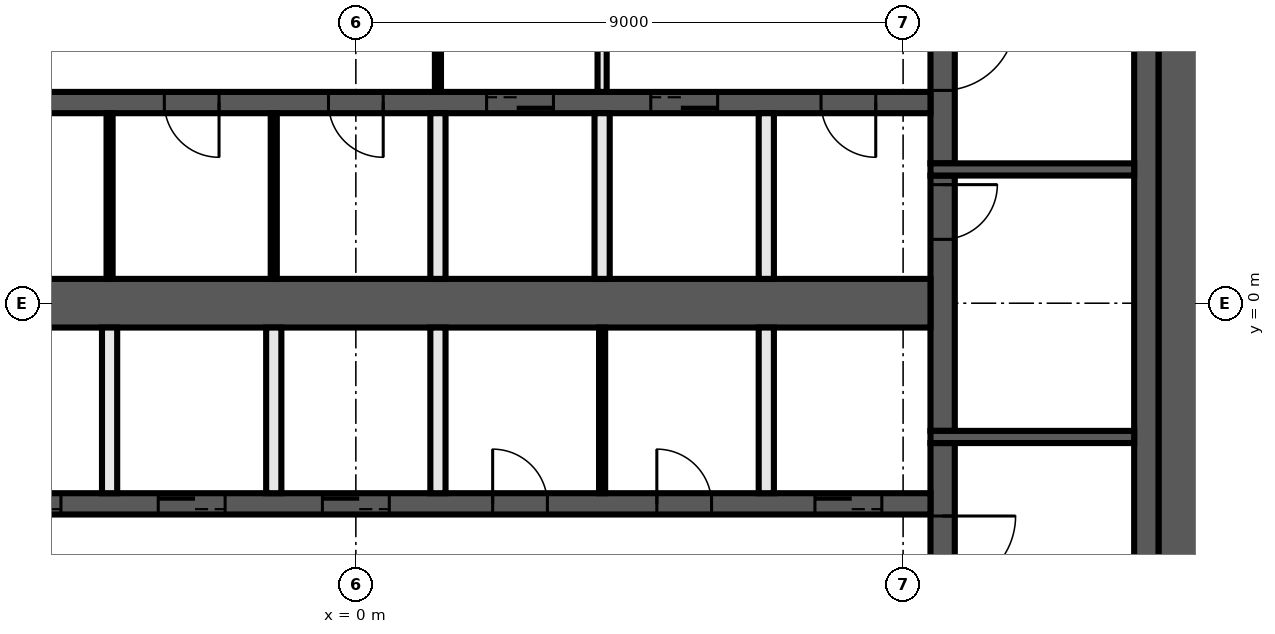
"""IFC4 building model, lengths in metres.
Left out: names, types, materials, properties, quantities, classifications, styles, units other than length and angle.
Written with IfcOpenShell. Run it as: python <this file> out.ifc"""

import sys

from ifc_helpers import new_model, si_unit, direction, frame, frame_2d, origin, place, context, subcontext, project, spatial, rectangle, extrude, element, fill, save


model = new_model("IFC4")
c1 = context("Model", 3, precision=1e-05, world=origin(), true_north=direction((0.0, 1.0)))
c2 = subcontext(c1, "Body", "Model", "MODEL_VIEW")
j1 = project(units=[si_unit("LENGTHUNIT", "METRE"), si_unit("PLANEANGLEUNIT", "RADIAN")], contexts=[c1])
p1 = place(None, origin())
s1 = spatial("IfcSite", under=j1, at=p1, CompositionType="ELEMENT")
p2 = place(p1, origin())
s2 = spatial("IfcBuilding", under=s1, at=p2, CompositionType="ELEMENT")
p3 = place(p2, frame((0.0, 0.0, 162.8)))
s3 = spatial("IfcBuildingStorey", under=s2, at=p3, CompositionType="ELEMENT", Elevation=162.8)
p4 = place(p3, frame((13.6, 10.2, 0.0), z_axis=(0.0, 0.0, 1.0), x_axis=(0.0, -1.0, 0.0)))
e1 = element("IfcWall", 1, at=p4, inside=s3, PredefinedType="SHEAR", context=c2, shape_type="SweptSolid", body=[
    extrude(rectangle(XDim=20.4, YDim=0.8, at=frame_2d((10.2, 0.0))), origin(), (0.0, 0.0, 1.0), 3.82),
])
p5 = place(p3, frame((13.0, 9.8, 0.0), z_axis=(0.0, 0.0, 1.0), x_axis=(0.0, -1.0, 0.0)))
e2 = element("IfcWall", 2, at=p5, inside=s3, PredefinedType="SHEAR", context=c2, shape_type="SweptSolid", body=[
    extrude(rectangle(XDim=19.6, YDim=0.4, at=frame_2d((9.8, 0.0))), origin(), (0.0, 0.0, 1.0), 3.82),
])
p6 = place(p3, frame((9.65, -2.3, 0.0), z_axis=(0.0, 0.0, 1.0), x_axis=(0.0, -1.0, 0.0)))
e3 = element("IfcWall", 3, at=p6, inside=s3, PredefinedType="SHEAR", context=c2, shape_type="SweptSolid", body=[
    extrude(rectangle(XDim=7.5, YDim=0.4, at=frame_2d((3.75, 0.0))), origin(), (0.0, 0.0, 1.0), 3.82),
])
p7 = place(p6, frame((1.2, 0.0, 0.0)))
e4 = element("IfcOpeningElement", 4, at=p7, cuts=e3, PredefinedType="OPENING", context=c2, shape_type="SweptSolid", body=[
    extrude(rectangle(XDim=1.2, YDim=2.1, at=frame_2d((0.6, 1.05))), frame((0.0, 0.21, 0.0), z_axis=(0.0, -1.0, 0.0), x_axis=(1.0, 0.0, 0.0)), (0.0, 0.0, 1.0), 0.42),
])
p8 = place(p3, frame((9.65, 2.1, 0.0), z_axis=(0.0, 0.0, 1.0), x_axis=(0.0, -1.0, 0.0)))
e5 = element("IfcWall", 5, at=p8, inside=s3, PredefinedType="SHEAR", context=c2, shape_type="SweptSolid", body=[
    extrude(rectangle(XDim=4.2, YDim=0.4, at=frame_2d((2.1, 0.0))), origin(), (0.0, 0.0, 1.0), 3.82),
])
p9 = place(p8, frame((0.15, 0.0, 0.0)))
e6 = element("IfcOpeningElement", 6, at=p9, cuts=e5, PredefinedType="OPENING", context=c2, shape_type="SweptSolid", body=[
    extrude(rectangle(XDim=0.9, YDim=2.1, at=frame_2d((0.45, 1.05))), frame((0.0, 0.21, 0.0), z_axis=(0.0, -1.0, 0.0), x_axis=(1.0, 0.0, 0.0)), (0.0, 0.0, 1.0), 0.42),
])
p10 = place(p3, frame((9.65, 9.8, 0.0), z_axis=(0.0, 0.0, 1.0), x_axis=(0.0, -1.0, 0.0)))
e7 = element("IfcWall", 7, at=p10, inside=s3, PredefinedType="SHEAR", context=c2, shape_type="SweptSolid", body=[
    extrude(rectangle(XDim=7.5, YDim=0.4, at=frame_2d((3.75, 0.0))), origin(), (0.0, 0.0, 1.0), 3.82),
])
p11 = place(p10, frame((5.1, 0.0, 0.0)))
e8 = element("IfcOpeningElement", 8, at=p11, cuts=e7, PredefinedType="OPENING", context=c2, shape_type="SweptSolid", body=[
    extrude(rectangle(XDim=1.2, YDim=2.1, at=frame_2d((0.6, 1.05))), frame((0.0, 0.21, 0.0), z_axis=(0.0, -1.0, 0.0), x_axis=(1.0, 0.0, 0.0)), (0.0, 0.0, 1.0), 0.42),
])
for number, where, z_axis, x_axis in (
    (9, (9.45, 2.2, 0.0), (0.0, 0.0, 1.0), (1.0, 0.0, 0.0)),
    (10, (9.45, -2.2, 0.0), (0.0, 0.0, 1.0), (1.0, 0.0, 0.0)),
):
    element("IfcWall", number, at=place(p3, frame(where, z_axis=z_axis, x_axis=x_axis)), inside=s3, PredefinedType="SHEAR", context=c2, shape_type="SweptSolid", body=[
        extrude(rectangle(XDim=3.35, YDim=0.2, at=frame_2d((1.675, 0.0))), origin(), (0.0, 0.0, 1.0), 3.82),
    ])
p12 = place(p3, frame((9.45, 3.3, 0.0), z_axis=(0.0, 0.0, 1.0), x_axis=(-1.0, 0.0, 0.0)))
e11 = element("IfcWall", 11, at=p12, inside=s3, PredefinedType="SHEAR", context=c2, shape_type="SweptSolid", body=[
    extrude(rectangle(XDim=18.9, YDim=0.35, at=frame_2d((9.45, 0.0))), origin(), (0.0, 0.0, 1.0), 3.82),
])
p13 = place(p12, frame((6.2, 0.0, 0.0)))
e12 = element("IfcOpeningElement", 12, at=p13, cuts=e11, PredefinedType="OPENING", context=c2, shape_type="SweptSolid", body=[
    extrude(rectangle(XDim=1.1, YDim=2.1, at=frame_2d((0.55, 1.05))), frame((0.0, 0.185, 0.0), z_axis=(0.0, -1.0, 0.0), x_axis=(1.0, 0.0, 0.0)), (0.0, 0.0, 1.0), 0.37),
])
p14 = place(p12, frame((3.5, 0.0, 0.0)))
e13 = element("IfcOpeningElement", 13, at=p14, cuts=e11, PredefinedType="OPENING", context=c2, shape_type="SweptSolid", body=[
    extrude(rectangle(XDim=1.1, YDim=2.1, at=frame_2d((0.55, 1.05))), frame((0.0, 0.185, 0.0), z_axis=(0.0, -1.0, 0.0), x_axis=(1.0, 0.0, 0.0)), (0.0, 0.0, 1.0), 0.37),
])
p15 = place(p12, frame((0.9, 0.0, 0.0)))
e14 = element("IfcOpeningElement", 14, at=p15, cuts=e11, PredefinedType="OPENING", context=c2, shape_type="SweptSolid", body=[
    extrude(rectangle(XDim=0.9, YDim=2.1, at=frame_2d((0.45, 1.05))), frame((0.0, 0.185, 0.0), z_axis=(0.0, -1.0, 0.0), x_axis=(1.0, 0.0, 0.0)), (0.0, 0.0, 1.0), 0.37),
])
p16 = place(p12, frame((15.75, 0.0, 0.0)))
e15 = element("IfcOpeningElement", 15, at=p16, cuts=e11, PredefinedType="OPENING", context=c2, shape_type="SweptSolid", body=[
    extrude(rectangle(XDim=0.9, YDim=2.1, at=frame_2d((0.45, 1.05))), frame((0.0, 0.185, 0.0), z_axis=(0.0, -1.0, 0.0), x_axis=(1.0, 0.0, 0.0)), (0.0, 0.0, 1.0), 0.37),
])
p17 = place(p12, frame((11.7, 0.0, 0.0)))
e16 = element("IfcOpeningElement", 16, at=p17, cuts=e11, PredefinedType="OPENING", context=c2, shape_type="SweptSolid", body=[
    extrude(rectangle(XDim=0.9, YDim=2.1, at=frame_2d((0.45, 1.05))), frame((0.0, 0.185, 0.0), z_axis=(0.0, -1.0, 0.0), x_axis=(1.0, 0.0, 0.0)), (0.0, 0.0, 1.0), 0.37),
])
p18 = place(p12, frame((9.0, 0.0, 0.0)))
e17 = element("IfcOpeningElement", 17, at=p18, cuts=e11, PredefinedType="OPENING", context=c2, shape_type="SweptSolid", body=[
    extrude(rectangle(XDim=0.9, YDim=2.1, at=frame_2d((0.45, 1.05))), frame((0.0, 0.185, 0.0), z_axis=(0.0, -1.0, 0.0), x_axis=(1.0, 0.0, 0.0)), (0.0, 0.0, 1.0), 0.37),
])
p19 = place(p3, frame((-9.45, -3.3, 0.0), z_axis=(0.0, 0.0, 1.0), x_axis=(1.0, 0.0, 0.0)))
e18 = element("IfcWall", 18, at=p19, inside=s3, PredefinedType="SHEAR", context=c2, shape_type="SweptSolid", body=[
    extrude(rectangle(XDim=18.9, YDim=0.35, at=frame_2d((9.45, 0.0))), origin(), (0.0, 0.0, 1.0), 3.82),
])
p20 = place(p19, frame((0.8, 0.0, 0.0)))
e19 = element("IfcOpeningElement", 19, at=p20, cuts=e18, PredefinedType="OPENING", context=c2, shape_type="SweptSolid", body=[
    extrude(rectangle(XDim=1.1, YDim=2.1, at=frame_2d((0.55, 1.05))), frame((0.0, 0.185, 0.0), z_axis=(0.0, -1.0, 0.0), x_axis=(1.0, 0.0, 0.0)), (0.0, 0.0, 1.0), 0.37),
])
p21 = place(p19, frame((3.5, 0.0, 0.0)))
e20 = element("IfcOpeningElement", 20, at=p21, cuts=e18, PredefinedType="OPENING", context=c2, shape_type="SweptSolid", body=[
    extrude(rectangle(XDim=1.1, YDim=2.1, at=frame_2d((0.55, 1.05))), frame((0.0, 0.185, 0.0), z_axis=(0.0, -1.0, 0.0), x_axis=(1.0, 0.0, 0.0)), (0.0, 0.0, 1.0), 0.37),
])
p22 = place(p19, frame((6.2, 0.0, 0.0)))
e21 = element("IfcOpeningElement", 21, at=p22, cuts=e18, PredefinedType="OPENING", context=c2, shape_type="SweptSolid", body=[
    extrude(rectangle(XDim=1.1, YDim=2.1, at=frame_2d((0.55, 1.05))), frame((0.0, 0.185, 0.0), z_axis=(0.0, -1.0, 0.0), x_axis=(1.0, 0.0, 0.0)), (0.0, 0.0, 1.0), 0.37),
])
p23 = place(p19, frame((8.9, 0.0, 0.0)))
e22 = element("IfcOpeningElement", 22, at=p23, cuts=e18, PredefinedType="OPENING", context=c2, shape_type="SweptSolid", body=[
    extrude(rectangle(XDim=1.1, YDim=2.1, at=frame_2d((0.55, 1.05))), frame((0.0, 0.185, 0.0), z_axis=(0.0, -1.0, 0.0), x_axis=(1.0, 0.0, 0.0)), (0.0, 0.0, 1.0), 0.37),
])
p24 = place(p19, frame((17.0, 0.0, 0.0)))
e23 = element("IfcOpeningElement", 23, at=p24, cuts=e18, PredefinedType="OPENING", context=c2, shape_type="SweptSolid", body=[
    extrude(rectangle(XDim=1.1, YDim=2.1, at=frame_2d((0.55, 1.05))), frame((0.0, 0.185, 0.0), z_axis=(0.0, -1.0, 0.0), x_axis=(1.0, 0.0, 0.0)), (0.0, 0.0, 1.0), 0.37),
])
p25 = place(p19, frame((11.7, 0.0, 0.0)))
e24 = element("IfcOpeningElement", 24, at=p25, cuts=e18, PredefinedType="OPENING", context=c2, shape_type="SweptSolid", body=[
    extrude(rectangle(XDim=0.9, YDim=2.1, at=frame_2d((0.45, 1.05))), frame((0.0, 0.185, 0.0), z_axis=(0.0, -1.0, 0.0), x_axis=(1.0, 0.0, 0.0)), (0.0, 0.0, 1.0), 0.37),
])
p26 = place(p19, frame((14.4, 0.0, 0.0)))
e25 = element("IfcOpeningElement", 25, at=p26, cuts=e18, PredefinedType="OPENING", context=c2, shape_type="SweptSolid", body=[
    extrude(rectangle(XDim=0.9, YDim=2.1, at=frame_2d((0.45, 1.05))), frame((0.0, 0.185, 0.0), z_axis=(0.0, -1.0, 0.0), x_axis=(1.0, 0.0, 0.0)), (0.0, 0.0, 1.0), 0.37),
])
p27 = place(p3, frame((-9.45, 0.0, 0.0), z_axis=(0.0, 0.0, 1.0), x_axis=(1.0, 0.0, 0.0)))
e26 = element("IfcWall", 26, at=p27, inside=s3, PredefinedType="SHEAR", context=c2, shape_type="SweptSolid", body=[
    extrude(rectangle(XDim=18.9, YDim=0.8, at=frame_2d((9.45, 0.0))), origin(), (0.0, 0.0, 1.0), 3.82),
])
for number, where, z_axis, x_axis in (
    (27, (6.75, -3.125, 0.0), (0.0, 0.0, 1.0), (0.0, 1.0, 0.0)),
    (28, (6.75, 0.4, 0.0), (0.0, 0.0, 1.0), (0.0, 1.0, 0.0)),
):
    element("IfcWall", number, at=place(p3, frame(where, z_axis=z_axis, x_axis=x_axis)), inside=s3, PredefinedType="SOLIDWALL", context=c2, shape_type="SweptSolid", body=[
        extrude(rectangle(XDim=2.725, YDim=0.25, at=frame_2d((1.363, 0.0))), origin(), (0.0, 0.0, 1.0), 3.82),
    ])
p28 = place(p3, frame((4.05, 6.725, 0.0), z_axis=(0.0, 0.0, 1.0), x_axis=(0.0, -1.0, 0.0)))
e29 = element("IfcWall", 29, at=p28, inside=s3, PredefinedType="PARTITIONING", context=c2, shape_type="SweptSolid", body=[
    extrude(rectangle(XDim=3.25, YDim=0.15, at=frame_2d((1.625, 0.0))), origin(), (0.0, 0.0, 1.0), 3.82),
])
p29 = place(p28, frame((1.025, 0.0, 0.0)))
e30 = element("IfcOpeningElement", 30, at=p29, cuts=e29, PredefinedType="OPENING", context=c2, shape_type="SweptSolid", body=[
    extrude(rectangle(XDim=1.2, YDim=2.1, at=frame_2d((0.6, 1.05))), frame((0.0, 0.085, 0.0), z_axis=(0.0, -1.0, 0.0), x_axis=(1.0, 0.0, 0.0)), (0.0, 0.0, 1.0), 0.17),
])
p30 = place(p3, frame((4.05, -3.125, 0.0), z_axis=(0.0, 0.0, 1.0), x_axis=(0.0, 1.0, 0.0)))
e31 = element("IfcWall", 31, at=p30, inside=s3, PredefinedType="PARTITIONING", context=c2, shape_type="SweptSolid", body=[
    extrude(rectangle(XDim=2.725, YDim=0.1, at=frame_2d((1.363, 0.0))), origin(), (0.0, 0.0, 1.0), 3.82),
])
p31 = place(p3, frame((4.05, 0.4, 0.0), z_axis=(0.0, 0.0, 1.0), x_axis=(0.0, 1.0, 0.0)))
e32 = element("IfcWall", 32, at=p31, inside=s3, PredefinedType="SOLIDWALL", context=c2, shape_type="SweptSolid", body=[
    extrude(rectangle(XDim=2.725, YDim=0.25, at=frame_2d((1.363, 0.0))), origin(), (0.0, 0.0, 1.0), 3.82),
])
p32 = place(p3, frame((1.35, 6.725, 0.0), z_axis=(0.0, 0.0, 1.0), x_axis=(0.0, -1.0, 0.0)))
e33 = element("IfcWall", 33, at=p32, inside=s3, PredefinedType="PARTITIONING", context=c2, shape_type="SweptSolid", body=[
    extrude(rectangle(XDim=3.25, YDim=0.1, at=frame_2d((1.625, 0.0))), origin(), (0.0, 0.0, 1.0), 3.82),
])
p33 = place(p32, frame((1.025, 0.0, 0.0)))
e34 = element("IfcOpeningElement", 34, at=p33, cuts=e33, PredefinedType="OPENING", context=c2, shape_type="SweptSolid", body=[
    extrude(rectangle(XDim=1.2, YDim=2.1, at=frame_2d((0.6, 1.05))), frame((0.0, 0.06, 0.0), z_axis=(0.0, -1.0, 0.0), x_axis=(1.0, 0.0, 0.0)), (0.0, 0.0, 1.0), 0.12),
])
for number, where, z_axis, x_axis in (
    (35, (1.35, -3.125, 0.0), (0.0, 0.0, 1.0), (0.0, 1.0, 0.0)),
    (36, (1.35, 0.4, 0.0), (0.0, 0.0, 1.0), (0.0, 1.0, 0.0)),
):
    element("IfcWall", number, at=place(p3, frame(where, z_axis=z_axis, x_axis=x_axis)), inside=s3, PredefinedType="SOLIDWALL", context=c2, shape_type="SweptSolid", body=[
        extrude(rectangle(XDim=2.725, YDim=0.25, at=frame_2d((1.363, 0.0))), origin(), (0.0, 0.0, 1.0), 3.82),
    ])
p34 = place(p3, frame((-1.35, 0.4, 0.0), z_axis=(0.0, 0.0, 1.0), x_axis=(0.0, 1.0, 0.0)))
e37 = element("IfcWall", 37, at=p34, inside=s3, PredefinedType="PARTITIONING", context=c2, shape_type="SweptSolid", body=[
    extrude(rectangle(XDim=2.725, YDim=0.1, at=frame_2d((1.363, 0.0))), origin(), (0.0, 0.0, 1.0), 3.82),
])
p35 = place(p3, frame((-1.35, -3.125, 0.0), z_axis=(0.0, 0.0, 1.0), x_axis=(0.0, 1.0, 0.0)))
e38 = element("IfcWall", 38, at=p35, inside=s3, PredefinedType="SOLIDWALL", context=c2, shape_type="SweptSolid", body=[
    extrude(rectangle(XDim=2.725, YDim=0.25, at=frame_2d((1.363, 0.0))), origin(), (0.0, 0.0, 1.0), 3.82),
])
p36 = place(p3, frame((-4.05, 0.4, 0.0), z_axis=(0.0, 0.0, 1.0), x_axis=(0.0, 1.0, 0.0)))
e39 = element("IfcWall", 39, at=p36, inside=s3, PredefinedType="PARTITIONING", context=c2, shape_type="SweptSolid", body=[
    extrude(rectangle(XDim=2.725, YDim=0.1, at=frame_2d((1.363, 0.0))), origin(), (0.0, 0.0, 1.0), 3.82),
])
p37 = place(p3, frame((-4.05, -3.125, 0.0), z_axis=(0.0, 0.0, 1.0), x_axis=(0.0, 1.0, 0.0)))
e40 = element("IfcWall", 40, at=p37, inside=s3, PredefinedType="SOLIDWALL", context=c2, shape_type="SweptSolid", body=[
    extrude(rectangle(XDim=2.725, YDim=0.25, at=frame_2d((1.363, 0.0))), origin(), (0.0, 0.0, 1.0), 3.82),
])
p38 = place(p9, origin())
e41 = element("IfcDoor", 41, at=p38, inside=s3, OperationType="SINGLE_SWING_RIGHT", PredefinedType="DOOR", context=c2, shape_type="SweptSolid", body=[
    extrude(rectangle(XDim=0.9, YDim=2.1, at=frame_2d((0.45, 1.05))), frame((0.0, 0.025, 0.0), z_axis=(0.0, -1.0, 0.0), x_axis=(1.0, 0.0, 0.0)), (0.0, 0.0, 1.0), 0.05),
])
fill(e6, e41)
p39 = place(p13, origin())
e42 = element("IfcDoor", 42, at=p39, inside=s3, OperationType="DOUBLE_DOOR_SLIDING", PredefinedType="DOOR", context=c2, shape_type="SweptSolid", body=[
    extrude(rectangle(XDim=1.1, YDim=2.1, at=frame_2d((0.55, 1.05))), frame((0.0, 0.025, 0.0), z_axis=(0.0, -1.0, 0.0), x_axis=(1.0, 0.0, 0.0)), (0.0, 0.0, 1.0), 0.05),
])
fill(e12, e42)
p40 = place(p14, origin())
e43 = element("IfcDoor", 43, at=p40, inside=s3, OperationType="DOUBLE_DOOR_SLIDING", PredefinedType="DOOR", context=c2, shape_type="SweptSolid", body=[
    extrude(rectangle(XDim=1.1, YDim=2.1, at=frame_2d((0.55, 1.05))), frame((0.0, 0.025, 0.0), z_axis=(0.0, -1.0, 0.0), x_axis=(1.0, 0.0, 0.0)), (0.0, 0.0, 1.0), 0.05),
])
fill(e13, e43)
p41 = place(p15, origin())
e44 = element("IfcDoor", 44, at=p41, inside=s3, OperationType="SINGLE_SWING_LEFT", PredefinedType="DOOR", context=c2, shape_type="SweptSolid", body=[
    extrude(rectangle(XDim=0.9, YDim=2.1, at=frame_2d((0.45, 1.05))), frame((0.0, 0.025, 0.0), z_axis=(0.0, -1.0, 0.0), x_axis=(1.0, 0.0, 0.0)), (0.0, 0.0, 1.0), 0.05),
])
fill(e14, e44)
p42 = place(p21, origin())
e45 = element("IfcDoor", 45, at=p42, inside=s3, OperationType="DOUBLE_DOOR_SLIDING", PredefinedType="DOOR", context=c2, shape_type="SweptSolid", body=[
    extrude(rectangle(XDim=1.1, YDim=2.1, at=frame_2d((0.55, 1.05))), frame((0.0, 0.025, 0.0), z_axis=(0.0, -1.0, 0.0), x_axis=(1.0, 0.0, 0.0)), (0.0, 0.0, 1.0), 0.05),
])
fill(e20, e45)
p43 = place(p22, origin())
e46 = element("IfcDoor", 46, at=p43, inside=s3, OperationType="DOUBLE_DOOR_SLIDING", PredefinedType="DOOR", context=c2, shape_type="SweptSolid", body=[
    extrude(rectangle(XDim=1.1, YDim=2.1, at=frame_2d((0.55, 1.05))), frame((0.0, 0.025, 0.0), z_axis=(0.0, -1.0, 0.0), x_axis=(1.0, 0.0, 0.0)), (0.0, 0.0, 1.0), 0.05),
])
fill(e21, e46)
p44 = place(p23, origin())
e47 = element("IfcDoor", 47, at=p44, inside=s3, OperationType="DOUBLE_DOOR_SLIDING", PredefinedType="DOOR", context=c2, shape_type="SweptSolid", body=[
    extrude(rectangle(XDim=1.1, YDim=2.1, at=frame_2d((0.55, 1.05))), frame((0.0, 0.025, 0.0), z_axis=(0.0, -1.0, 0.0), x_axis=(1.0, 0.0, 0.0)), (0.0, 0.0, 1.0), 0.05),
])
fill(e22, e47)
p45 = place(p24, origin())
e48 = element("IfcDoor", 48, at=p45, inside=s3, OperationType="DOUBLE_DOOR_SLIDING", PredefinedType="DOOR", context=c2, shape_type="SweptSolid", body=[
    extrude(rectangle(XDim=1.1, YDim=2.1, at=frame_2d((0.55, 1.05))), frame((0.0, 0.025, 0.0), z_axis=(0.0, -1.0, 0.0), x_axis=(1.0, 0.0, 0.0)), (0.0, 0.0, 1.0), 0.05),
])
fill(e23, e48)
p46 = place(p17, origin())
e49 = element("IfcDoor", 49, at=p46, inside=s3, OperationType="SINGLE_SWING_RIGHT", PredefinedType="DOOR", context=c2, shape_type="SweptSolid", body=[
    extrude(rectangle(XDim=0.9, YDim=2.1, at=frame_2d((0.45, 1.05))), frame((0.0, 0.025, 0.0), z_axis=(0.0, -1.0, 0.0), x_axis=(1.0, 0.0, 0.0)), (0.0, 0.0, 1.0), 0.05),
])
fill(e16, e49)
p47 = place(p18, origin())
e50 = element("IfcDoor", 50, at=p47, inside=s3, OperationType="SINGLE_SWING_LEFT", PredefinedType="DOOR", context=c2, shape_type="SweptSolid", body=[
    extrude(rectangle(XDim=0.9, YDim=2.1, at=frame_2d((0.45, 1.05))), frame((0.0, 0.025, 0.0), z_axis=(0.0, -1.0, 0.0), x_axis=(1.0, 0.0, 0.0)), (0.0, 0.0, 1.0), 0.05),
])
fill(e17, e50)
p48 = place(p25, origin())
e51 = element("IfcDoor", 51, at=p48, inside=s3, OperationType="SINGLE_SWING_RIGHT", PredefinedType="DOOR", context=c2, shape_type="SweptSolid", body=[
    extrude(rectangle(XDim=0.9, YDim=2.1, at=frame_2d((0.45, 1.05))), frame((0.0, 0.025, 0.0), z_axis=(0.0, -1.0, 0.0), x_axis=(1.0, 0.0, 0.0)), (0.0, 0.0, 1.0), 0.05),
])
fill(e24, e51)
p49 = place(p26, origin())
e52 = element("IfcDoor", 52, at=p49, inside=s3, OperationType="SINGLE_SWING_LEFT", PredefinedType="DOOR", context=c2, shape_type="SweptSolid", body=[
    extrude(rectangle(XDim=0.9, YDim=2.1, at=frame_2d((0.45, 1.05))), frame((0.0, 0.025, 0.0), z_axis=(0.0, -1.0, 0.0), x_axis=(1.0, 0.0, 0.0)), (0.0, 0.0, 1.0), 0.05),
])
fill(e25, e52)
p50 = place(p11, origin())
e53 = element("IfcDoor", 53, at=p50, inside=s3, OperationType="SINGLE_SWING_LEFT", PredefinedType="DOOR", context=c2, shape_type="SweptSolid", body=[
    extrude(rectangle(XDim=1.2, YDim=2.1, at=frame_2d((0.6, 1.05))), frame((0.0, 0.025, 0.0), z_axis=(0.0, -1.0, 0.0), x_axis=(1.0, 0.0, 0.0)), (0.0, 0.0, 1.0), 0.05),
])
fill(e8, e53)
p51 = place(p7, origin())
e54 = element("IfcDoor", 54, at=p51, inside=s3, OperationType="SINGLE_SWING_RIGHT", PredefinedType="DOOR", context=c2, shape_type="SweptSolid", body=[
    extrude(rectangle(XDim=1.2, YDim=2.1, at=frame_2d((0.6, 1.05))), frame((0.0, 0.025, 0.0), z_axis=(0.0, -1.0, 0.0), x_axis=(1.0, 0.0, 0.0)), (0.0, 0.0, 1.0), 0.05),
])
fill(e4, e54)
save(model, sys.argv[1])
